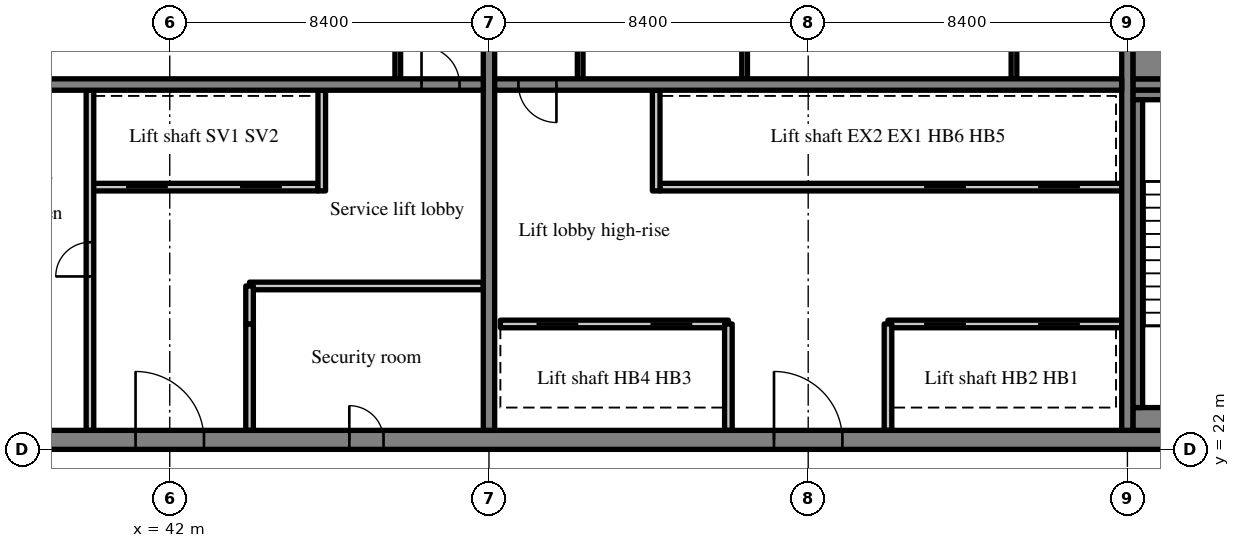
"""IFC4 building model, lengths in metres.
Left out: names, types, materials, properties, quantities, classifications, styles, units other than length and angle.
Written with IfcOpenShell. Run it as: python <this file> out.ifc"""

import sys

from ifc_helpers import new_model, si_unit, direction, frame, frame_2d, origin, place, context, subcontext, project, spatial, rectangle, extrude, source, transform, mapped, element, fill, save


model = new_model("IFC4")
c1 = context("Model", 3, precision=1e-05, world=origin(), true_north=direction((0.0, 1.0)))
c2 = subcontext(c1, "Body", "Model", "MODEL_VIEW")
j1 = project(units=[si_unit("LENGTHUNIT", "METRE"), si_unit("PLANEANGLEUNIT", "RADIAN")], contexts=[c1])
p1 = place(None, origin())
s1 = spatial("IfcSite", under=j1, at=p1, CompositionType="ELEMENT")
p2 = place(p1, origin())
s2 = spatial("IfcBuilding", under=s1, at=p2, CompositionType="ELEMENT")
p3 = place(p2, frame((0.0, 0.0, 297.7)))
s3 = spatial("IfcBuildingStorey", under=s2, at=p3, CompositionType="ELEMENT", Elevation=297.7)
m1 = source(origin(), c2, "Body", "SweptSolid", [
    extrude(rectangle(XDim=50.4, YDim=0.5, at=frame_2d((25.2, 0.0))), origin(), (0.0, 0.0, 1.0), 3.72),
])
p4 = place(p3, frame((25.2, 22.25, 0.0), z_axis=(0.0, 0.0, 1.0), x_axis=(1.0, 0.0, 0.0)))
e1 = element("IfcWall", 1, at=p4, inside=s3, PredefinedType="SHEAR", context=c2, shape_type="MappedRepresentation", body=[
    mapped(m1, transform((0.0, 0.0, 0.0), scale=1.0)),
])
m2 = source(origin(), c2, "Body", "SweptSolid", [
    extrude(rectangle(XDim=1.8, YDim=2.1, at=frame_2d((0.9, 1.05))), frame((0.0, 0.26, 0.0), z_axis=(0.0, -1.0, 0.0), x_axis=(1.0, 0.0, 0.0)), (0.0, 0.0, 1.0), 0.52),
])
p5 = place(p4, frame((15.9, 0.0, 0.0)))
e2 = element("IfcOpeningElement", 2, at=p5, cuts=e1, PredefinedType="OPENING", context=c2, shape_type="MappedRepresentation", body=[
    mapped(m2, transform((0.0, 0.0, 0.0), scale=1.0)),
])
m3 = source(origin(), c2, "Body", "SweptSolid", [
    extrude(rectangle(XDim=0.9, YDim=2.1, at=frame_2d((0.45, 1.05))), frame((0.0, 0.26, 0.0), z_axis=(0.0, -1.0, 0.0), x_axis=(1.0, 0.0, 0.0)), (0.0, 0.0, 1.0), 0.52),
])
p6 = place(p4, frame((9.675, 0.0, 0.0)))
e3 = element("IfcOpeningElement", 3, at=p6, cuts=e1, PredefinedType="OPENING", context=c2, shape_type="MappedRepresentation", body=[
    mapped(m3, transform((0.0, 0.0, 0.0), scale=1.0)),
])
p7 = place(p4, frame((21.525, 0.0, 0.0)))
e4 = element("IfcOpeningElement", 4, at=p7, cuts=e1, PredefinedType="OPENING", context=c2, shape_type="MappedRepresentation", body=[
    mapped(m3, transform((0.0, 0.0, 0.0), scale=1.0)),
])
p8 = place(p4, frame((32.7, 0.0, 0.0)))
e5 = element("IfcOpeningElement", 5, at=p8, cuts=e1, PredefinedType="OPENING", context=c2, shape_type="MappedRepresentation", body=[
    mapped(m2, transform((0.0, 0.0, 0.0), scale=1.0)),
])
m4 = source(origin(), c2, "Body", "SweptSolid", [
    extrude(rectangle(XDim=1.2, YDim=2.1, at=frame_2d((0.6, 1.05))), frame((0.0, 0.26, 0.0), z_axis=(0.0, -1.0, 0.0), x_axis=(1.0, 0.0, 0.0)), (0.0, 0.0, 1.0), 0.52),
])
p9 = place(p4, frame((6.5, 0.0, 0.0)))
e6 = element("IfcOpeningElement", 6, at=p9, cuts=e1, PredefinedType="OPENING", context=c2, shape_type="MappedRepresentation", body=[
    mapped(m4, transform((0.0, 0.0, 0.0), scale=1.0)),
])
p10 = place(p4, frame((47.975, 0.0, 0.0)))
e7 = element("IfcOpeningElement", 7, at=p10, cuts=e1, PredefinedType="OPENING", context=c2, shape_type="MappedRepresentation", body=[
    mapped(m4, transform((0.0, 0.0, 0.0), scale=1.0)),
])
m5 = source(origin(), c2, "Body", "SweptSolid", [
    extrude(rectangle(XDim=19.0, YDim=0.3, at=frame_2d((9.5, 0.0))), origin(), (0.0, 0.0, 1.0), 3.72),
])
p11 = place(p3, frame((50.4, 22.5, 0.0), z_axis=(0.0, 0.0, 1.0), x_axis=(0.0, 1.0, 0.0)))
e8 = element("IfcWall", 8, at=p11, inside=s3, PredefinedType="SHEAR", context=c2, shape_type="MappedRepresentation", body=[
    mapped(m5, transform((0.0, 0.0, 0.0), scale=1.0)),
])
m6 = source(origin(), c2, "Body", "SweptSolid", [
    extrude(rectangle(XDim=1.1, YDim=2.1, at=frame_2d((0.55, 1.05))), frame((0.0, 0.16, 0.0), z_axis=(0.0, -1.0, 0.0), x_axis=(1.0, 0.0, 0.0)), (0.0, 0.0, 1.0), 0.32),
])
p12 = place(p11, frame((12.95, 0.0, 0.0)))
e9 = element("IfcOpeningElement", 9, at=p12, cuts=e8, PredefinedType="OPENING", context=c2, shape_type="MappedRepresentation", body=[
    mapped(m6, transform((0.0, 0.0, 0.0), scale=1.0)),
])
p13 = place(p3, frame((67.2, 22.5, 0.0), z_axis=(0.0, 0.0, 1.0), x_axis=(0.0, 1.0, 0.0)))
e10 = element("IfcWall", 10, at=p13, inside=s3, PredefinedType="SHEAR", context=c2, shape_type="MappedRepresentation", body=[
    mapped(m5, transform((0.0, 0.0, 0.0), scale=1.0)),
])
m7 = source(origin(), c2, "Body", "SweptSolid", [
    extrude(rectangle(XDim=16.5, YDim=0.3, at=frame_2d((8.25, 0.0))), origin(), (0.0, 0.0, 1.0), 3.72),
])
p14 = place(p3, frame((33.75, 31.6, 0.0), z_axis=(0.0, 0.0, 1.0), x_axis=(1.0, 0.0, 0.0)))
e11 = element("IfcWall", 11, at=p14, inside=s3, PredefinedType="SHEAR", context=c2, shape_type="MappedRepresentation", body=[
    mapped(m7, transform((0.0, 0.0, 0.0), scale=1.0)),
])
m8 = source(origin(), c2, "Body", "SweptSolid", [
    extrude(rectangle(XDim=1.0, YDim=2.1, at=frame_2d((0.5, 1.05))), frame((0.0, 0.16, 0.0), z_axis=(0.0, -1.0, 0.0), x_axis=(1.0, 0.0, 0.0)), (0.0, 0.0, 1.0), 0.32),
])
p15 = place(p14, frame((14.875, 0.0, 0.0)))
e12 = element("IfcOpeningElement", 12, at=p15, cuts=e11, PredefinedType="OPENING", context=c2, shape_type="MappedRepresentation", body=[
    mapped(m8, transform((0.0, 0.0, 0.0), scale=1.0)),
])
p16 = place(p3, frame((50.55, 31.6, 0.0), z_axis=(0.0, 0.0, 1.0), x_axis=(1.0, 0.0, 0.0)))
e13 = element("IfcWall", 13, at=p16, inside=s3, PredefinedType="SHEAR", context=c2, shape_type="MappedRepresentation", body=[
    mapped(m7, transform((0.0, 0.0, 0.0), scale=1.0)),
])
p17 = place(p16, frame((0.625, 0.0, 0.0)))
e14 = element("IfcOpeningElement", 14, at=p17, cuts=e13, PredefinedType="OPENING", context=c2, shape_type="MappedRepresentation", body=[
    mapped(m8, transform((0.0, 0.0, 0.0), scale=1.0)),
])
m9 = source(origin(), c2, "Body", "SweptSolid", [
    extrude(rectangle(XDim=7.75, YDim=0.3, at=frame_2d((3.875, 0.0))), origin(), (0.0, 0.0, 1.0), 3.72),
])
p18 = place(p3, frame((67.35, 31.6, 0.0), z_axis=(0.0, 0.0, 1.0), x_axis=(1.0, 0.0, 0.0)))
e15 = element("IfcWall", 15, at=p18, inside=s3, PredefinedType="SHEAR", context=c2, shape_type="MappedRepresentation", body=[
    mapped(m9, transform((0.0, 0.0, 0.0), scale=1.0)),
])
p19 = place(p18, frame((5.875, 0.0, 0.0)))
e16 = element("IfcOpeningElement", 16, at=p19, cuts=e15, PredefinedType="OPENING", context=c2, shape_type="MappedRepresentation", body=[
    mapped(m6, transform((0.0, 0.0, 0.0), scale=1.0)),
])
m10 = source(origin(), c2, "Body", "SweptSolid", [
    extrude(rectangle(XDim=6.0, YDim=0.2, at=frame_2d((3.0, 0.0))), origin(), (0.0, 0.0, 1.0), 3.72),
])
p20 = place(p3, frame((39.9, 28.9, 0.0), z_axis=(0.0, 0.0, 1.0), x_axis=(1.0, 0.0, 0.0)))
e17 = element("IfcWall", 17, at=p20, inside=s3, PredefinedType="SOLIDWALL", context=c2, shape_type="MappedRepresentation", body=[
    mapped(m10, transform((0.0, 0.0, 0.0), scale=1.0)),
])
m11 = source(origin(), c2, "Body", "SweptSolid", [
    extrude(rectangle(XDim=1.1, YDim=2.1, at=frame_2d((0.55, 1.05))), frame((0.0, 0.11, 0.0), z_axis=(0.0, -1.0, 0.0), x_axis=(1.0, 0.0, 0.0)), (0.0, 0.0, 1.0), 0.22),
])
p21 = place(p20, frame((0.95, 0.0, 0.0)))
e18 = element("IfcOpeningElement", 18, at=p21, cuts=e17, PredefinedType="OPENING", context=c2, shape_type="MappedRepresentation", body=[
    mapped(m11, transform((0.0, 0.0, 0.0), scale=1.0)),
])
p22 = place(p20, frame((3.95, 0.0, 0.0)))
e19 = element("IfcOpeningElement", 19, at=p22, cuts=e17, PredefinedType="OPENING", context=c2, shape_type="MappedRepresentation", body=[
    mapped(m11, transform((0.0, 0.0, 0.0), scale=1.0)),
])
m12 = source(origin(), c2, "Body", "SweptSolid", [
    extrude(rectangle(XDim=8.95, YDim=0.2, at=frame_2d((4.475, 0.0))), origin(), (0.0, 0.0, 1.0), 3.72),
])
p23 = place(p3, frame((39.9, 22.5, 0.0), z_axis=(0.0, 0.0, 1.0), x_axis=(0.0, 1.0, 0.0)))
e20 = element("IfcWall", 20, at=p23, inside=s3, PredefinedType="PARTITIONING", context=c2, shape_type="MappedRepresentation", body=[
    mapped(m12, transform((0.0, 0.0, 0.0), scale=1.0)),
])
m13 = source(origin(), c2, "Body", "SweptSolid", [
    extrude(rectangle(XDim=0.9, YDim=2.1, at=frame_2d((0.45, 1.05))), frame((0.0, 0.11, 0.0), z_axis=(0.0, -1.0, 0.0), x_axis=(1.0, 0.0, 0.0)), (0.0, 0.0, 1.0), 0.22),
])
p24 = place(p23, frame((4.05, 0.0, 0.0)))
e21 = element("IfcOpeningElement", 21, at=p24, cuts=e20, PredefinedType="OPENING", context=c2, shape_type="MappedRepresentation", body=[
    mapped(m13, transform((0.0, 0.0, 0.0), scale=1.0)),
])
m14 = source(origin(), c2, "Body", "SweptSolid", [
    extrude(rectangle(XDim=2.8, YDim=0.2, at=frame_2d((1.4, 0.0))), origin(), (0.0, 0.0, 1.0), 3.72),
])
p25 = place(p3, frame((44.1, 22.5, 0.0), z_axis=(0.0, 0.0, 1.0), x_axis=(0.0, 1.0, 0.0)))
e22 = element("IfcWall", 22, at=p25, inside=s3, PredefinedType="PARTITIONING", context=c2, shape_type="MappedRepresentation", body=[
    mapped(m14, transform((0.0, 0.0, 0.0), scale=1.0)),
])
m15 = source(origin(), c2, "Body", "SweptSolid", [
    extrude(rectangle(XDim=2.65, YDim=0.2, at=frame_2d((1.325, 0.0))), origin(), (0.0, 0.0, 1.0), 3.72),
])
p26 = place(p3, frame((46.0, 28.8, 0.0), z_axis=(0.0, 0.0, 1.0), x_axis=(0.0, 1.0, 0.0)))
e23 = element("IfcWall", 23, at=p26, inside=s3, PredefinedType="SOLIDWALL", context=c2, shape_type="MappedRepresentation", body=[
    mapped(m15, transform((0.0, 0.0, 0.0), scale=1.0)),
])
m16 = source(origin(), c2, "Body", "SweptSolid", [
    extrude(rectangle(XDim=6.15, YDim=0.2, at=frame_2d((3.075, 0.0))), origin(), (0.0, 0.0, 1.0), 3.72),
])
p27 = place(p3, frame((44.1, 26.3, 0.0), z_axis=(0.0, 0.0, 1.0), x_axis=(1.0, 0.0, 0.0)))
e24 = element("IfcWall", 24, at=p27, inside=s3, PredefinedType="PARTITIONING", context=c2, shape_type="MappedRepresentation", body=[
    mapped(m16, transform((0.0, 0.0, 0.0), scale=1.0)),
])
m17 = source(origin(), c2, "Body", "SweptSolid", [
    extrude(rectangle(XDim=1.0, YDim=0.2, at=frame_2d((0.5, 0.0))), origin(), (0.0, 0.0, 1.0), 3.72),
])
p28 = place(p3, frame((44.1, 25.3, 0.0), z_axis=(0.0, 0.0, 1.0), x_axis=(0.0, 1.0, 0.0)))
e25 = element("IfcWall", 25, at=p28, inside=s3, PredefinedType="PARTITIONING", context=c2, shape_type="MappedRepresentation", body=[
    mapped(m17, transform((0.0, 0.0, 0.0), scale=1.0)),
])
m18 = source(origin(), c2, "Body", "SweptSolid", [
    extrude(rectangle(XDim=3.25, YDim=0.15, at=frame_2d((1.625, 0.0))), origin(), (0.0, 0.0, 1.0), 3.72),
])
p29 = place(p3, frame((48.0, 31.75, 0.0), z_axis=(0.0, 0.0, 1.0), x_axis=(0.0, 1.0, 0.0)))
e26 = element("IfcWall", 26, at=p29, inside=s3, PredefinedType="PARTITIONING", context=c2, shape_type="MappedRepresentation", body=[
    mapped(m18, transform((0.0, 0.0, 0.0), scale=1.0)),
])
m19 = source(origin(), c2, "Body", "SweptSolid", [
    extrude(rectangle(XDim=6.15, YDim=0.2, at=frame_2d((3.075, 0.0))), origin(), (0.0, 0.0, 1.0), 3.72),
])
p30 = place(p3, frame((67.05, 25.3, 0.0), z_axis=(0.0, 0.0, 1.0), x_axis=(-1.0, 0.0, 0.0)))
e27 = element("IfcWall", 27, at=p30, inside=s3, PredefinedType="SOLIDWALL", context=c2, shape_type="MappedRepresentation", body=[
    mapped(m19, transform((0.0, 0.0, 0.0), scale=1.0)),
])
p31 = place(p30, frame((1.1, 0.0, 0.0)))
e28 = element("IfcOpeningElement", 28, at=p31, cuts=e27, PredefinedType="OPENING", context=c2, shape_type="MappedRepresentation", body=[
    mapped(m11, transform((0.0, 0.0, 0.0), scale=1.0)),
])
p32 = place(p30, frame((4.1, 0.0, 0.0)))
e29 = element("IfcOpeningElement", 29, at=p32, cuts=e27, PredefinedType="OPENING", context=c2, shape_type="MappedRepresentation", body=[
    mapped(m11, transform((0.0, 0.0, 0.0), scale=1.0)),
])
p33 = place(p3, frame((56.7, 25.3, 0.0), z_axis=(0.0, 0.0, 1.0), x_axis=(-1.0, 0.0, 0.0)))
e30 = element("IfcWall", 30, at=p33, inside=s3, PredefinedType="SOLIDWALL", context=c2, shape_type="MappedRepresentation", body=[
    mapped(m10, transform((0.0, 0.0, 0.0), scale=1.0)),
])
p34 = place(p33, frame((0.95, 0.0, 0.0)))
e31 = element("IfcOpeningElement", 31, at=p34, cuts=e30, PredefinedType="OPENING", context=c2, shape_type="MappedRepresentation", body=[
    mapped(m11, transform((0.0, 0.0, 0.0), scale=1.0)),
])
p35 = place(p33, frame((3.95, 0.0, 0.0)))
e32 = element("IfcOpeningElement", 32, at=p35, cuts=e30, PredefinedType="OPENING", context=c2, shape_type="MappedRepresentation", body=[
    mapped(m11, transform((0.0, 0.0, 0.0), scale=1.0)),
])
m20 = source(origin(), c2, "Body", "SweptSolid", [
    extrude(rectangle(XDim=12.15, YDim=0.2, at=frame_2d((6.075, 0.0))), origin(), (0.0, 0.0, 1.0), 3.72),
])
p36 = place(p3, frame((67.05, 28.9, 0.0), z_axis=(0.0, 0.0, 1.0), x_axis=(-1.0, 0.0, 0.0)))
e33 = element("IfcWall", 33, at=p36, inside=s3, PredefinedType="SOLIDWALL", context=c2, shape_type="MappedRepresentation", body=[
    mapped(m20, transform((0.0, 0.0, 0.0), scale=1.0)),
])
p37 = place(p36, frame((1.1, 0.0, 0.0)))
e34 = element("IfcOpeningElement", 34, at=p37, cuts=e33, PredefinedType="OPENING", context=c2, shape_type="MappedRepresentation", body=[
    mapped(m11, transform((0.0, 0.0, 0.0), scale=1.0)),
])
p38 = place(p36, frame((4.1, 0.0, 0.0)))
e35 = element("IfcOpeningElement", 35, at=p38, cuts=e33, PredefinedType="OPENING", context=c2, shape_type="MappedRepresentation", body=[
    mapped(m11, transform((0.0, 0.0, 0.0), scale=1.0)),
])
for number, where, z_axis, x_axis in (
    (36, (60.9, 22.5, 0.0), (0.0, 0.0, 1.0), (0.0, 1.0, 0.0)),
    (37, (56.7, 22.5, 0.0), (0.0, 0.0, 1.0), (0.0, 1.0, 0.0)),
):
    element("IfcWall", number, at=place(p3, frame(where, z_axis=z_axis, x_axis=x_axis)), inside=s3, PredefinedType="SOLIDWALL", context=c2, shape_type="MappedRepresentation", body=[
        mapped(m14, transform((0.0, 0.0, 0.0), scale=1.0)),
    ])
p39 = place(p3, frame((54.8, 28.8, 0.0), z_axis=(0.0, 0.0, 1.0), x_axis=(0.0, 1.0, 0.0)))
e38 = element("IfcWall", 38, at=p39, inside=s3, PredefinedType="SOLIDWALL", context=c2, shape_type="MappedRepresentation", body=[
    mapped(m15, transform((0.0, 0.0, 0.0), scale=1.0)),
])
for number, where, z_axis, x_axis in (
    (39, (52.8, 31.75, 0.0), (0.0, 0.0, 1.0), (0.0, 1.0, 0.0)),
    (40, (64.215, 31.75, 0.0), (0.0, 0.0, 1.0), (0.0, 1.0, 0.0)),
    (41, (57.127, 31.75, 0.0), (0.0, 0.0, 1.0), (0.0, 1.0, 0.0)),
):
    element("IfcWall", number, at=place(p3, frame(where, z_axis=z_axis, x_axis=x_axis)), inside=s3, PredefinedType="PARTITIONING", context=c2, shape_type="MappedRepresentation", body=[
        mapped(m18, transform((0.0, 0.0, 0.0), scale=1.0)),
    ])
m21 = source(origin(), c2, "Body", "SweptSolid", [
    extrude(rectangle(XDim=4.9, YDim=0.6, at=frame_2d((2.45, 0.0))), origin(), (0.0, 0.0, 1.0), 3.72),
])
p40 = place(p3, frame((67.35, 22.8, 0.0), z_axis=(0.0, 0.0, 1.0), x_axis=(1.0, 0.0, 0.0)))
e42 = element("IfcWall", 42, at=p40, inside=s3, PredefinedType="SOLIDWALL", context=c2, shape_type="MappedRepresentation", body=[
    mapped(m21, transform((0.0, 0.0, 0.0), scale=1.0)),
])
m22 = source(origin(), c2, "Body", "SweptSolid", [
    extrude(rectangle(XDim=4.9, YDim=0.25, at=frame_2d((2.45, 0.0))), origin(), (0.0, 0.0, 1.0), 3.72),
])
p41 = place(p3, frame((67.35, 31.325, 0.0), z_axis=(0.0, 0.0, 1.0), x_axis=(1.0, 0.0, 0.0)))
e43 = element("IfcWall", 43, at=p41, inside=s3, PredefinedType="SOLIDWALL", context=c2, shape_type="MappedRepresentation", body=[
    mapped(m22, transform((0.0, 0.0, 0.0), scale=1.0)),
])
m23 = source(origin(), c2, "Body", "SweptSolid", [
    extrude(rectangle(XDim=8.1, YDim=0.25, at=frame_2d((4.05, 0.0))), origin(), (0.0, 0.0, 1.0), 3.72),
])
p42 = place(p3, frame((67.475, 23.1, 0.0), z_axis=(0.0, 0.0, 1.0), x_axis=(0.0, 1.0, 0.0)))
e44 = element("IfcWall", 44, at=p42, inside=s3, PredefinedType="SOLIDWALL", context=c2, shape_type="MappedRepresentation", body=[
    mapped(m23, transform((0.0, 0.0, 0.0), scale=1.0)),
])
m24 = source(origin(), c2, "Body", "SweptSolid", [
    extrude(rectangle(XDim=4.9, YDim=1.05, at=frame_2d((2.45, 0.0))), origin(), (0.0, 0.0, 1.0), 3.72),
])
p43 = place(p3, frame((67.35, 32.275, 0.0), z_axis=(0.0, 0.0, 1.0), x_axis=(1.0, 0.0, 0.0)))
e45 = element("IfcWall", 45, at=p43, inside=s3, PredefinedType="SOLIDWALL", context=c2, shape_type="MappedRepresentation", body=[
    mapped(m24, transform((0.0, 0.0, 0.0), scale=1.0)),
])
m25 = source(origin(), c2, "Body", "SweptSolid", [
    extrude(rectangle(XDim=1.8, YDim=2.1, at=frame_2d((0.9, 1.05))), frame((0.0, 0.175, 0.0), z_axis=(0.0, -1.0, 0.0), x_axis=(1.0, 0.0, 0.0)), (0.0, 0.0, 1.0), 0.05),
])
p44 = place(p5, origin())
e46 = element("IfcDoor", 46, at=p44, inside=s3, OperationType="DOUBLE_DOOR_SINGLE_SWING", PredefinedType="DOOR", context=c2, shape_type="MappedRepresentation", body=[
    mapped(m25, transform((0.0, 0.0, 0.0), scale=1.0)),
])
fill(e2, e46)
m26 = source(origin(), c2, "Body", "SweptSolid", [
    extrude(rectangle(XDim=1.0, YDim=2.1, at=frame_2d((0.5, 1.05))), frame((0.0, 0.025, 0.0), z_axis=(0.0, -1.0, 0.0), x_axis=(1.0, 0.0, 0.0)), (0.0, 0.0, 1.0), 0.05),
])
p45 = place(p15, origin())
e47 = element("IfcDoor", 47, at=p45, inside=s3, OperationType="SINGLE_SWING_LEFT", PredefinedType="DOOR", context=c2, shape_type="MappedRepresentation", body=[
    mapped(m26, transform((0.0, 0.0, 0.0), scale=1.0)),
])
fill(e12, e47)
m27 = source(origin(), c2, "Body", "SweptSolid", [
    extrude(rectangle(XDim=1.1, YDim=2.1, at=frame_2d((0.55, 1.05))), frame((0.0, 0.025, 0.0), z_axis=(0.0, -1.0, 0.0), x_axis=(1.0, 0.0, 0.0)), (0.0, 0.0, 1.0), 0.05),
])
p46 = place(p21, origin())
e48 = element("IfcDoor", 48, at=p46, inside=s3, OperationType="SLIDING_TO_LEFT", PredefinedType="DOOR", context=c2, shape_type="MappedRepresentation", body=[
    mapped(m27, transform((0.0, 0.0, 0.0), scale=1.0)),
])
fill(e18, e48)
p47 = place(p22, origin())
e49 = element("IfcDoor", 49, at=p47, inside=s3, OperationType="SLIDING_TO_RIGHT", PredefinedType="DOOR", context=c2, shape_type="MappedRepresentation", body=[
    mapped(m27, transform((0.0, 0.0, 0.0), scale=1.0)),
])
fill(e19, e49)
m28 = source(origin(), c2, "Body", "SweptSolid", [
    extrude(rectangle(XDim=0.9, YDim=2.1, at=frame_2d((0.45, 1.05))), frame((0.0, 0.025, 0.0), z_axis=(0.0, -1.0, 0.0), x_axis=(1.0, 0.0, 0.0)), (0.0, 0.0, 1.0), 0.05),
])
p48 = place(p24, origin())
e50 = element("IfcDoor", 50, at=p48, inside=s3, OperationType="SINGLE_SWING_LEFT", PredefinedType="DOOR", context=c2, shape_type="MappedRepresentation", body=[
    mapped(m28, transform((0.0, 0.0, 0.0), scale=1.0)),
])
fill(e21, e50)
m29 = source(origin(), c2, "Body", "SweptSolid", [
    extrude(rectangle(XDim=0.9, YDim=2.1, at=frame_2d((0.45, 1.05))), frame((0.0, 0.175, 0.0), z_axis=(0.0, -1.0, 0.0), x_axis=(1.0, 0.0, 0.0)), (0.0, 0.0, 1.0), 0.05),
])
p49 = place(p7, origin())
e51 = element("IfcDoor", 51, at=p49, inside=s3, OperationType="SINGLE_SWING_LEFT", PredefinedType="DOOR", context=c2, shape_type="MappedRepresentation", body=[
    mapped(m29, transform((0.0, 0.0, 0.0), scale=1.0)),
])
fill(e4, e51)
p50 = place(p8, origin())
e52 = element("IfcDoor", 52, at=p50, inside=s3, OperationType="DOUBLE_DOOR_SINGLE_SWING", PredefinedType="DOOR", context=c2, shape_type="MappedRepresentation", body=[
    mapped(m25, transform((0.0, 0.0, 0.0), scale=1.0)),
])
fill(e5, e52)
p51 = place(p17, origin())
e53 = element("IfcDoor", 53, at=p51, inside=s3, OperationType="SINGLE_SWING_RIGHT", PredefinedType="DOOR", context=c2, shape_type="MappedRepresentation", body=[
    mapped(m26, transform((0.0, 0.0, 0.0), scale=1.0)),
])
fill(e14, e53)
p52 = place(p31, origin())
e54 = element("IfcDoor", 54, at=p52, inside=s3, OperationType="SLIDING_TO_RIGHT", PredefinedType="DOOR", context=c2, shape_type="MappedRepresentation", body=[
    mapped(m27, transform((0.0, 0.0, 0.0), scale=1.0)),
])
fill(e28, e54)
p53 = place(p32, origin())
e55 = element("IfcDoor", 55, at=p53, inside=s3, OperationType="SLIDING_TO_LEFT", PredefinedType="DOOR", context=c2, shape_type="MappedRepresentation", body=[
    mapped(m27, transform((0.0, 0.0, 0.0), scale=1.0)),
])
fill(e29, e55)
p54 = place(p34, origin())
e56 = element("IfcDoor", 56, at=p54, inside=s3, OperationType="SLIDING_TO_RIGHT", PredefinedType="DOOR", context=c2, shape_type="MappedRepresentation", body=[
    mapped(m27, transform((0.0, 0.0, 0.0), scale=1.0)),
])
fill(e31, e56)
p55 = place(p35, origin())
e57 = element("IfcDoor", 57, at=p55, inside=s3, OperationType="SLIDING_TO_LEFT", PredefinedType="DOOR", context=c2, shape_type="MappedRepresentation", body=[
    mapped(m27, transform((0.0, 0.0, 0.0), scale=1.0)),
])
fill(e32, e57)
p56 = place(p37, origin())
e58 = element("IfcDoor", 58, at=p56, inside=s3, OperationType="SLIDING_TO_RIGHT", PredefinedType="DOOR", context=c2, shape_type="MappedRepresentation", body=[
    mapped(m27, transform((0.0, 0.0, 0.0), scale=1.0)),
])
fill(e34, e58)
p57 = place(p38, origin())
e59 = element("IfcDoor", 59, at=p57, inside=s3, OperationType="SLIDING_TO_LEFT", PredefinedType="DOOR", context=c2, shape_type="MappedRepresentation", body=[
    mapped(m27, transform((0.0, 0.0, 0.0), scale=1.0)),
])
fill(e35, e59)
save(model, sys.argv[1])
